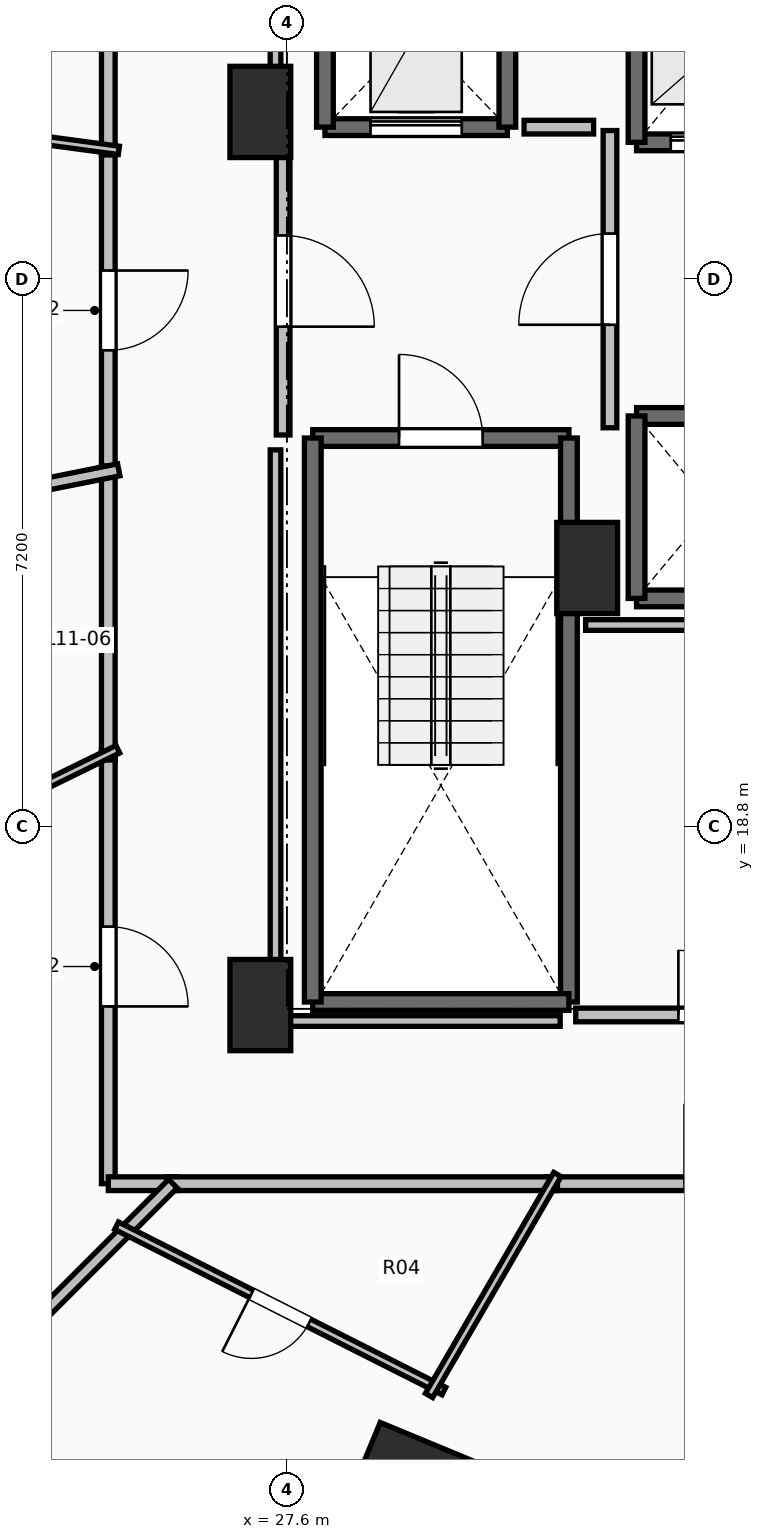
"""IFC4 building model, lengths in metres.
Left out: names, types, materials, properties, quantities, classifications, styles, units other than length and angle.
Written with IfcOpenShell. Run it as: python <this file> out.ifc"""

import sys

from ifc_helpers import new_model, si_unit, direction, frame, frame_2d, origin, origin_2d, place, context, subcontext, project, spatial, rectangle, extrude, element, fill, save


model = new_model("IFC4")
c1 = context("Model", 3, precision=1e-05, world=origin(), true_north=direction((0.0, 1.0)))
c2 = subcontext(c1, "Body", "Model", "MODEL_VIEW")
j1 = project(units=[si_unit("LENGTHUNIT", "METRE"), si_unit("PLANEANGLEUNIT", "RADIAN")], contexts=[c1])
p1 = place(None, origin())
s1 = spatial("IfcSite", under=j1, at=p1, CompositionType="ELEMENT")
p2 = place(p1, origin())
s2 = spatial("IfcBuilding", under=s1, at=p2, CompositionType="ELEMENT")
p3 = place(p2, frame((0.0, 0.0, 45.0)))
s3 = spatial("IfcBuildingStorey", under=s2, at=p3, CompositionType="ELEMENT", Elevation=45.0)
p4 = place(p3, frame((29.179, 10.109, 0.0), z_axis=(0.0, 0.0, 1.0), x_axis=(-0.382683432365, -0.923879532511, 0.0)))
e1 = element("IfcColumn", 1, at=p4, inside=s3, PredefinedType="COLUMN", context=c2, shape_type="SweptSolid", body=[
    extrude(rectangle(XDim=1.3, YDim=1.3, at=origin_2d()), origin(), (0.0, 0.0, 1.0), 3.5),
])
for number, where, z_axis, x_axis in (
    (2, (27.25, 16.45, 0.0), (0.0, 0.0, 1.0), (1.0, 0.0, 0.0)),
    (3, (27.25, 28.2, 0.0), (0.0, 0.0, 1.0), (1.0, 0.0, 0.0)),
    (4, (31.55, 22.2, 0.0), (0.0, 0.0, 1.0), (1.0, 0.0, 0.0)),
):
    element("IfcColumn", number, at=place(p3, frame(where, z_axis=z_axis, x_axis=x_axis)), inside=s3, PredefinedType="PILASTER", context=c2, shape_type="SweptSolid", body=[
        extrude(rectangle(XDim=0.8, YDim=1.2, at=origin_2d()), origin(), (0.0, 0.0, 1.0), 3.5),
    ])
p5 = place(p3, frame((27.94, 23.91, 0.0), z_axis=(0.0, 0.0, 1.0), x_axis=(1.0, 0.0, 0.0)))
e5 = element("IfcWall", 5, at=p5, inside=s3, PredefinedType="SOLIDWALL", context=c2, shape_type="SweptSolid", body=[
    extrude(rectangle(XDim=3.37, YDim=0.22, at=frame_2d((1.685, 0.0))), origin(), (0.0, 0.0, 1.0), 3.24),
])
p6 = place(p5, frame((1.135, 0.0, 0.0)))
e6 = element("IfcOpeningElement", 6, at=p6, cuts=e5, PredefinedType="OPENING", context=c2, shape_type="SweptSolid", body=[
    extrude(rectangle(XDim=1.1, YDim=2.15, at=frame_2d((0.55, 1.075))), frame((0.0, 0.125, 0.0), z_axis=(0.0, -1.0, 0.0), x_axis=(1.0, 0.0, 0.0)), (0.0, 0.0, 1.0), 0.25),
])
p7 = place(p3, frame((31.31, 23.91, 0.0), z_axis=(0.0, 0.0, 1.0), x_axis=(0.0, -1.0, 0.0)))
e7 = element("IfcWall", 7, at=p7, inside=s3, PredefinedType="SOLIDWALL", context=c2, shape_type="SweptSolid", body=[
    extrude(rectangle(XDim=7.42, YDim=0.22, at=frame_2d((3.71, 0.0))), origin(), (0.0, 0.0, 1.0), 3.24),
])
p8 = place(p3, frame((31.31, 16.49, 0.0), z_axis=(0.0, 0.0, 1.0), x_axis=(-1.0, 0.0, 0.0)))
e8 = element("IfcWall", 8, at=p8, inside=s3, PredefinedType="SOLIDWALL", context=c2, shape_type="SweptSolid", body=[
    extrude(rectangle(XDim=3.37, YDim=0.22, at=frame_2d((1.685, 0.0))), origin(), (0.0, 0.0, 1.0), 3.24),
])
p9 = place(p3, frame((27.94, 16.49, 0.0), z_axis=(0.0, 0.0, 1.0), x_axis=(0.0, 1.0, 0.0)))
e9 = element("IfcWall", 9, at=p9, inside=s3, PredefinedType="SOLIDWALL", context=c2, shape_type="SweptSolid", body=[
    extrude(rectangle(XDim=7.42, YDim=0.22, at=frame_2d((3.71, 0.0))), origin(), (0.0, 0.0, 1.0), 3.24),
])
p10 = place(p3, frame((32.2, 27.8, 0.0), z_axis=(0.0, 0.0, 1.0), x_axis=(1.0, 0.0, 0.0)))
e10 = element("IfcWall", 10, at=p10, inside=s3, PredefinedType="SOLIDWALL", context=c2, shape_type="SweptSolid", body=[
    extrude(rectangle(XDim=2.0, YDim=0.22, at=frame_2d((1.0, 0.0))), origin(), (0.0, 0.0, 1.0), 3.24),
])
p11 = place(p10, frame((0.45, 0.0, 0.0)))
e11 = element("IfcOpeningElement", 11, at=p11, cuts=e10, PredefinedType="OPENING", context=c2, shape_type="SweptSolid", body=[
    extrude(rectangle(XDim=1.1, YDim=2.2, at=frame_2d((0.55, 1.1))), frame((0.0, 0.125, 0.0), z_axis=(0.0, -1.0, 0.0), x_axis=(1.0, 0.0, 0.0)), (0.0, 0.0, 1.0), 0.25),
])
p12 = place(p3, frame((32.2, 30.2, 0.0), z_axis=(0.0, 0.0, 1.0), x_axis=(0.0, -1.0, 0.0)))
e12 = element("IfcWall", 12, at=p12, inside=s3, PredefinedType="SOLIDWALL", context=c2, shape_type="SweptSolid", body=[
    extrude(rectangle(XDim=2.4, YDim=0.22, at=frame_2d((1.2, 0.0))), origin(), (0.0, 0.0, 1.0), 3.24),
])
for number, where, z_axis, x_axis in (
    (13, (32.2, 21.8, 0.0), (0.0, 0.0, 1.0), (1.0, 0.0, 0.0)),
    (14, (34.2, 24.2, 0.0), (0.0, 0.0, 1.0), (-1.0, 0.0, 0.0)),
):
    element("IfcWall", number, at=place(p3, frame(where, z_axis=z_axis, x_axis=x_axis)), inside=s3, PredefinedType="SOLIDWALL", context=c2, shape_type="SweptSolid", body=[
        extrude(rectangle(XDim=2.0, YDim=0.22, at=frame_2d((1.0, 0.0))), origin(), (0.0, 0.0, 1.0), 3.24),
    ])
p13 = place(p3, frame((32.2, 24.2, 0.0), z_axis=(0.0, 0.0, 1.0), x_axis=(0.0, -1.0, 0.0)))
e15 = element("IfcWall", 15, at=p13, inside=s3, PredefinedType="SOLIDWALL", context=c2, shape_type="SweptSolid", body=[
    extrude(rectangle(XDim=2.4, YDim=0.22, at=frame_2d((1.2, 0.0))), origin(), (0.0, 0.0, 1.0), 3.24),
])
p14 = place(p3, frame((28.1, 28.0, 0.0), z_axis=(0.0, 0.0, 1.0), x_axis=(1.0, 0.0, 0.0)))
e16 = element("IfcWall", 16, at=p14, inside=s3, PredefinedType="SHEAR", context=c2, shape_type="SweptSolid", body=[
    extrude(rectangle(XDim=2.4, YDim=0.22, at=frame_2d((1.2, 0.0))), origin(), (0.0, 0.0, 1.0), 3.24),
])
p15 = place(p14, frame((0.6, 0.0, 0.0)))
e17 = element("IfcOpeningElement", 17, at=p15, cuts=e16, PredefinedType="OPENING", context=c2, shape_type="SweptSolid", body=[
    extrude(rectangle(XDim=1.2, YDim=2.2, at=frame_2d((0.6, 1.1))), frame((0.0, 0.125, 0.0), z_axis=(0.0, -1.0, 0.0), x_axis=(1.0, 0.0, 0.0)), (0.0, 0.0, 1.0), 0.25),
])
for number, where, z_axis, x_axis in (
    (18, (30.5, 28.0, 0.0), (0.0, 0.0, 1.0), (0.0, 1.0, 0.0)),
    (19, (28.1, 30.5, 0.0), (0.0, 0.0, 1.0), (0.0, -1.0, 0.0)),
):
    element("IfcWall", number, at=place(p3, frame(where, z_axis=z_axis, x_axis=x_axis)), inside=s3, PredefinedType="SHEAR", context=c2, shape_type="SweptSolid", body=[
        extrude(rectangle(XDim=2.5, YDim=0.22, at=frame_2d((1.25, 0.0))), origin(), (0.0, 0.0, 1.0), 3.24),
    ])
p16 = place(p3, frame((31.85, 24.045, 0.0), z_axis=(0.0, 0.0, 1.0), x_axis=(0.0, 1.0, 0.0)))
e20 = element("IfcWall", 20, at=p16, inside=s3, PredefinedType="PARTITIONING", context=c2, shape_type="SweptSolid", body=[
    extrude(rectangle(XDim=3.91, YDim=0.18, at=frame_2d((1.955, 0.0))), origin(), (0.0, 0.0, 1.0), 3.24),
])
p17 = place(p16, frame((1.355, 0.0, 0.0)))
e21 = element("IfcOpeningElement", 21, at=p17, cuts=e20, PredefinedType="OPENING", context=c2, shape_type="SweptSolid", body=[
    extrude(rectangle(XDim=1.2, YDim=2.15, at=frame_2d((0.6, 1.075))), frame((0.0, 0.105, 0.0), z_axis=(0.0, -1.0, 0.0), x_axis=(1.0, 0.0, 0.0)), (0.0, 0.0, 1.0), 0.21),
])
p18 = place(p3, frame((27.55, 28.0, 0.0), z_axis=(0.0, 0.0, 1.0), x_axis=(0.0, -1.0, 0.0)))
e22 = element("IfcWall", 22, at=p18, inside=s3, PredefinedType="PARTITIONING", context=c2, shape_type="SweptSolid", body=[
    extrude(rectangle(XDim=4.05, YDim=0.18, at=frame_2d((2.025, 0.0))), origin(), (0.0, 0.0, 1.0), 3.24),
])
p19 = place(p18, frame((1.425, 0.0, 0.0)))
e23 = element("IfcOpeningElement", 23, at=p19, cuts=e22, PredefinedType="OPENING", context=c2, shape_type="SweptSolid", body=[
    extrude(rectangle(XDim=1.2, YDim=2.15, at=frame_2d((0.6, 1.075))), frame((0.0, 0.105, 0.0), z_axis=(0.0, -1.0, 0.0), x_axis=(1.0, 0.0, 0.0)), (0.0, 0.0, 1.0), 0.21),
])
p20 = place(p3, frame((31.4, 16.32, 0.0), z_axis=(0.0, 0.0, 1.0), x_axis=(1.0, 0.0, 0.0)))
e24 = element("IfcWall", 24, at=p20, inside=s3, PredefinedType="PARTITIONING", context=c2, shape_type="SweptSolid", body=[
    extrude(rectangle(XDim=3.55, YDim=0.18, at=frame_2d((1.775, 0.0))), origin(), (0.0, 0.0, 1.0), 3.24),
])
p21 = place(p20, frame((1.35, 0.0, 0.0)))
e25 = element("IfcOpeningElement", 25, at=p21, cuts=e24, PredefinedType="OPENING", context=c2, shape_type="SweptSolid", body=[
    extrude(rectangle(XDim=0.85, YDim=2.1, at=frame_2d((0.425, 1.05))), frame((0.0, 0.105, 0.0), z_axis=(0.0, -1.0, 0.0), x_axis=(1.0, 0.0, 0.0)), (0.0, 0.0, 1.0), 0.21),
])
p22 = place(p3, frame((25.25, 27.774, 0.0), z_axis=(0.0, 0.0, 1.0), x_axis=(0.0, -1.0, 0.0)))
e26 = element("IfcWall", 26, at=p22, inside=s3, PredefinedType="PARTITIONING", context=c2, shape_type="SweptSolid", body=[
    extrude(rectangle(XDim=4.371, YDim=0.18, at=frame_2d((2.186, 0.0))), origin(), (0.0, 0.0, 1.0), 2.432),
])
p23 = place(p22, frame((1.66, 0.0, 0.0)))
e27 = element("IfcOpeningElement", 27, at=p23, cuts=e26, PredefinedType="OPENING", context=c2, shape_type="SweptSolid", body=[
    extrude(rectangle(XDim=1.05, YDim=2.2, at=frame_2d((0.525, 1.1))), frame((0.0, 0.105, 0.0), z_axis=(0.0, -1.0, 0.0), x_axis=(1.0, 0.0, 0.0)), (0.0, 0.0, 1.0), 0.21),
])
p24 = place(p3, frame((25.25, 31.361, 0.0), z_axis=(0.0, 0.0, 1.0), x_axis=(0.0, -1.0, 0.0)))
e28 = element("IfcWall", 28, at=p24, inside=s3, PredefinedType="PARTITIONING", context=c2, shape_type="SweptSolid", body=[
    extrude(rectangle(XDim=3.727, YDim=0.18, at=frame_2d((1.864, 0.0))), origin(), (0.0, 0.0, 1.0), 2.432),
])
p25 = place(p3, frame((25.25, 19.814, 0.0), z_axis=(0.0, 0.0, 1.0), x_axis=(0.0, -1.0, 0.0)))
e29 = element("IfcWall", 29, at=p25, inside=s3, PredefinedType="PARTITIONING", context=c2, shape_type="SweptSolid", body=[
    extrude(rectangle(XDim=5.714, YDim=0.18, at=frame_2d((2.857, 0.0))), origin(), (0.0, 0.0, 1.0), 2.432),
])
p26 = place(p25, frame((2.332, 0.0, 0.0)))
e30 = element("IfcOpeningElement", 30, at=p26, cuts=e29, PredefinedType="OPENING", context=c2, shape_type="SweptSolid", body=[
    extrude(rectangle(XDim=1.05, YDim=2.2, at=frame_2d((0.525, 1.1))), frame((0.0, 0.105, 0.0), z_axis=(0.0, -1.0, 0.0), x_axis=(1.0, 0.0, 0.0)), (0.0, 0.0, 1.0), 0.21),
])
p27 = place(p3, frame((25.25, 14.1, 0.0), z_axis=(0.0, 0.0, 1.0), x_axis=(1.0, 0.0, 0.0)))
e31 = element("IfcWall", 31, at=p27, inside=s3, PredefinedType="PARTITIONING", context=c2, shape_type="SweptSolid", body=[
    extrude(rectangle(XDim=0.91, YDim=0.18, at=frame_2d((0.455, 0.0))), origin(), (0.0, 0.0, 1.0), 2.886),
])
p28 = place(p3, frame((25.25, 23.543, 0.0), z_axis=(0.0, 0.0, 1.0), x_axis=(0.0, -1.0, 0.0)))
e32 = element("IfcWall", 32, at=p28, inside=s3, PredefinedType="PARTITIONING", context=c2, shape_type="SweptSolid", body=[
    extrude(rectangle(XDim=3.869, YDim=0.18, at=frame_2d((1.935, 0.0))), origin(), (0.0, 0.0, 1.0), 3.24),
])
p29 = place(p3, frame((31.019, 14.1, 0.0), z_axis=(0.0, 0.0, 1.0), x_axis=(1.0, 0.0, 0.0)))
e33 = element("IfcWall", 33, at=p29, inside=s3, PredefinedType="PARTITIONING", context=c2, shape_type="SweptSolid", body=[
    extrude(rectangle(XDim=4.674, YDim=0.18, at=frame_2d((2.337, 0.0))), origin(), (0.0, 0.0, 1.0), 3.24),
])
p30 = place(p29, frame((1.812, 0.0, 0.0)))
e34 = element("IfcOpeningElement", 34, at=p30, cuts=e33, PredefinedType="OPENING", context=c2, shape_type="SweptSolid", body=[
    extrude(rectangle(XDim=1.05, YDim=2.2, at=frame_2d((0.525, 1.1))), frame((0.0, 0.105, 0.0), z_axis=(0.0, -1.0, 0.0), x_axis=(1.0, 0.0, 0.0)), (0.0, 0.0, 1.0), 0.21),
])
p31 = place(p3, frame((26.02, 14.1, 0.0), z_axis=(0.0, 0.0, 1.0), x_axis=(1.0, 0.0, 0.0)))
e35 = element("IfcWall", 35, at=p31, inside=s3, PredefinedType="PARTITIONING", context=c2, shape_type="SweptSolid", body=[
    extrude(rectangle(XDim=5.139, YDim=0.18, at=frame_2d((2.569, 0.0))), origin(), (0.0, 0.0, 1.0), 2.432),
])
p32 = place(p3, frame((25.389, 27.694, 0.0), z_axis=(0.0, 0.0, 1.0), x_axis=(-0.991111683087, 0.133032445848, 0.0)))
e36 = element("IfcWall", 36, at=p32, inside=s3, PredefinedType="PARTITIONING", context=c2, shape_type="SweptSolid", body=[
    extrude(rectangle(XDim=5.504, YDim=0.11, at=frame_2d((2.752, 0.0))), origin(), (0.0, 0.0, 1.0), 2.432),
])
p33 = place(p32, frame((2.327, 0.0, 0.0)))
e37 = element("IfcOpeningElement", 37, at=p33, cuts=e36, PredefinedType="OPENING", context=c2, shape_type="SweptSolid", body=[
    extrude(rectangle(XDim=0.85, YDim=2.1, at=frame_2d((0.425, 1.05))), frame((0.0, 0.07, 0.0), z_axis=(0.0, -1.0, 0.0), x_axis=(1.0, 0.0, 0.0)), (0.0, 0.0, 1.0), 0.14),
])
p34 = place(p3, frame((20.285, 22.476, 0.0), z_axis=(0.0, 0.0, 1.0), x_axis=(0.980785905074, 0.195087181559, 0.0)))
e38 = element("IfcWall", 38, at=p34, inside=s3, PredefinedType="PARTITIONING", context=c2, shape_type="SweptSolid", body=[
    extrude(rectangle(XDim=5.202, YDim=0.16, at=frame_2d((2.601, 0.0))), origin(), (0.0, 0.0, 1.0), 2.886),
])
p35 = place(p3, frame((25.376, 19.816, 0.0), z_axis=(0.0, 0.0, 1.0), x_axis=(-0.89800930559, -0.439976461954, 0.0)))
e39 = element("IfcWall", 39, at=p35, inside=s3, PredefinedType="PARTITIONING", context=c2, shape_type="SweptSolid", body=[
    extrude(rectangle(XDim=3.096, YDim=0.11, at=frame_2d((1.548, 0.0))), origin(), (0.0, 0.0, 1.0), 3.24),
])
p36 = place(p3, frame((20.247, 8.247, 0.0), z_axis=(0.0, 0.0, 1.0), x_axis=(0.707106781187, 0.707106781187, 0.0)))
e40 = element("IfcWall", 40, at=p36, inside=s3, PredefinedType="PARTITIONING", context=c2, shape_type="SweptSolid", body=[
    extrude(rectangle(XDim=8.277, YDim=0.16, at=frame_2d((4.139, 0.0))), origin(), (0.0, 0.0, 1.0), 2.624),
])
p37 = place(p3, frame((29.665, 11.372, 0.0), z_axis=(0.0, 0.0, 1.0), x_axis=(-0.892577568201, 0.450893873039, 0.0)))
e41 = element("IfcWall", 41, at=p37, inside=s3, PredefinedType="PARTITIONING", context=c2, shape_type="SweptSolid", body=[
    extrude(rectangle(XDim=4.824, YDim=0.11, at=frame_2d((2.412, 0.0))), origin(), (0.0, 0.0, 1.0), 2.432),
])
p38 = place(p37, frame((1.987, 0.0, 0.0)))
e42 = element("IfcOpeningElement", 42, at=p38, cuts=e41, PredefinedType="OPENING", context=c2, shape_type="SweptSolid", body=[
    extrude(rectangle(XDim=0.85, YDim=2.1, at=frame_2d((0.425, 1.05))), frame((0.0, 0.07, 0.0), z_axis=(0.0, -1.0, 0.0), x_axis=(1.0, 0.0, 0.0)), (0.0, 0.0, 1.0), 0.14),
])
p39 = place(p3, frame((31.158, 14.221, 0.0), z_axis=(0.0, 0.0, 1.0), x_axis=(-0.50222661214, -0.864736046466, 0.0)))
e43 = element("IfcWall", 43, at=p39, inside=s3, PredefinedType="PARTITIONING", context=c2, shape_type="SweptSolid", body=[
    extrude(rectangle(XDim=3.362, YDim=0.11, at=frame_2d((1.681, 0.0))), origin(), (0.0, 0.0, 1.0), 2.886),
])
p40 = place(p3, frame((31.635, 28.0, 0.0), z_axis=(0.0, 0.0, 1.0), x_axis=(-1.0, 0.0, 0.0)))
e44 = element("IfcWall", 44, at=p40, inside=s3, PredefinedType="PARTITIONING", context=c2, shape_type="SweptSolid", body=[
    extrude(rectangle(XDim=0.915, YDim=0.18, at=frame_2d((0.458, 0.0))), origin(), (0.0, 0.0, 1.0), 3.24),
])
p41 = place(p3, frame((34.73, 21.45, 0.0), z_axis=(0.0, 0.0, 1.0), x_axis=(-1.0, 0.0, 0.0)))
e45 = element("IfcWall", 45, at=p41, inside=s3, PredefinedType="PARTITIONING", context=c2, shape_type="SweptSolid", body=[
    extrude(rectangle(XDim=3.2, YDim=0.14, at=frame_2d((1.6, 0.0))), origin(), (0.0, 0.0, 1.0), 3.24),
])
p42 = place(p3, frame((31.195, 16.24, 0.0), z_axis=(0.0, 0.0, 1.0), x_axis=(-1.0, 0.0, 0.0)))
e46 = element("IfcWall", 46, at=p42, inside=s3, PredefinedType="PARTITIONING", context=c2, shape_type="SweptSolid", body=[
    extrude(rectangle(XDim=3.745, YDim=0.14, at=frame_2d((1.873, 0.0))), origin(), (0.0, 0.0, 1.0), 2.432),
])
p43 = place(p3, frame((27.45, 16.24, 0.0), z_axis=(0.0, 0.0, 1.0), x_axis=(0.0, 1.0, 0.0)))
e47 = element("IfcWall", 47, at=p43, inside=s3, PredefinedType="PARTITIONING", context=c2, shape_type="SweptSolid", body=[
    extrude(rectangle(XDim=7.514, YDim=0.14, at=frame_2d((3.757, 0.0))), origin(), (0.0, 0.0, 1.0), 2.432),
])
p44 = place(p3, frame((27.45, 28.196, 0.0), z_axis=(0.0, 0.0, 1.0), x_axis=(0.0, 1.0, 0.0)))
e48 = element("IfcWall", 48, at=p44, inside=s3, PredefinedType="PARTITIONING", context=c2, shape_type="SweptSolid", body=[
    extrude(rectangle(XDim=5.254, YDim=0.14, at=frame_2d((2.627, 0.0))), origin(), (0.0, 0.0, 1.0), 2.432),
])
p45 = place(p6, origin())
e49 = element("IfcDoor", 49, at=p45, inside=s3, OperationType="SINGLE_SWING_LEFT", PredefinedType="DOOR", context=c2, shape_type="SweptSolid", body=[
    extrude(rectangle(XDim=1.1, YDim=2.15, at=frame_2d((0.55, 1.075))), frame((0.0, 0.025, 0.0), z_axis=(0.0, -1.0, 0.0), x_axis=(1.0, 0.0, 0.0)), (0.0, 0.0, 1.0), 0.05),
])
fill(e6, e49)
p46 = place(p11, origin())
e50 = element("IfcDoor", 50, at=p46, inside=s3, OperationType="SLIDING_TO_LEFT", PredefinedType="DOOR", context=c2, shape_type="SweptSolid", body=[
    extrude(rectangle(XDim=1.1, YDim=2.2, at=frame_2d((0.55, 1.1))), frame((0.0, 0.025, 0.0), z_axis=(0.0, -1.0, 0.0), x_axis=(1.0, 0.0, 0.0)), (0.0, 0.0, 1.0), 0.05),
])
fill(e11, e50)
p47 = place(p15, origin())
e51 = element("IfcDoor", 51, at=p47, inside=s3, OperationType="SLIDING_TO_LEFT", PredefinedType="DOOR", context=c2, shape_type="SweptSolid", body=[
    extrude(rectangle(XDim=1.2, YDim=2.2, at=frame_2d((0.6, 1.1))), frame((0.0, 0.025, 0.0), z_axis=(0.0, -1.0, 0.0), x_axis=(1.0, 0.0, 0.0)), (0.0, 0.0, 1.0), 0.05),
])
fill(e17, e51)
p48 = place(p17, origin())
e52 = element("IfcDoor", 52, at=p48, inside=s3, OperationType="SINGLE_SWING_LEFT", PredefinedType="DOOR", context=c2, shape_type="SweptSolid", body=[
    extrude(rectangle(XDim=1.2, YDim=2.15, at=frame_2d((0.6, 1.075))), frame((0.0, 0.025, 0.0), z_axis=(0.0, -1.0, 0.0), x_axis=(1.0, 0.0, 0.0)), (0.0, 0.0, 1.0), 0.05),
])
fill(e21, e52)
p49 = place(p19, origin())
e53 = element("IfcDoor", 53, at=p49, inside=s3, OperationType="SINGLE_SWING_RIGHT", PredefinedType="DOOR", context=c2, shape_type="SweptSolid", body=[
    extrude(rectangle(XDim=1.2, YDim=2.15, at=frame_2d((0.6, 1.075))), frame((0.0, 0.025, 0.0), z_axis=(0.0, -1.0, 0.0), x_axis=(1.0, 0.0, 0.0)), (0.0, 0.0, 1.0), 0.05),
])
fill(e23, e53)
p50 = place(p21, origin())
e54 = element("IfcDoor", 54, at=p50, inside=s3, OperationType="SINGLE_SWING_LEFT", PredefinedType="DOOR", context=c2, shape_type="SweptSolid", body=[
    extrude(rectangle(XDim=0.85, YDim=2.1, at=frame_2d((0.425, 1.05))), frame((0.0, 0.025, 0.0), z_axis=(0.0, -1.0, 0.0), x_axis=(1.0, 0.0, 0.0)), (0.0, 0.0, 1.0), 0.05),
])
fill(e25, e54)
p51 = place(p23, origin())
e55 = element("IfcDoor", 55, at=p51, inside=s3, OperationType="SINGLE_SWING_LEFT", PredefinedType="DOOR", context=c2, shape_type="SweptSolid", body=[
    extrude(rectangle(XDim=1.05, YDim=2.2, at=frame_2d((0.525, 1.1))), frame((0.0, 0.025, 0.0), z_axis=(0.0, -1.0, 0.0), x_axis=(1.0, 0.0, 0.0)), (0.0, 0.0, 1.0), 0.05),
])
fill(e27, e55)
p52 = place(p26, origin())
e56 = element("IfcDoor", 56, at=p52, inside=s3, OperationType="SINGLE_SWING_RIGHT", PredefinedType="DOOR", context=c2, shape_type="SweptSolid", body=[
    extrude(rectangle(XDim=1.05, YDim=2.2, at=frame_2d((0.525, 1.1))), frame((0.0, 0.025, 0.0), z_axis=(0.0, -1.0, 0.0), x_axis=(1.0, 0.0, 0.0)), (0.0, 0.0, 1.0), 0.05),
])
fill(e30, e56)
p53 = place(p38, origin())
e57 = element("IfcDoor", 57, at=p53, inside=s3, OperationType="SINGLE_SWING_RIGHT", PredefinedType="DOOR", context=c2, shape_type="SweptSolid", body=[
    extrude(rectangle(XDim=0.85, YDim=2.1, at=frame_2d((0.425, 1.05))), frame((0.0, 0.025, 0.0), z_axis=(0.0, -1.0, 0.0), x_axis=(1.0, 0.0, 0.0)), (0.0, 0.0, 1.0), 0.05),
])
fill(e42, e57)
save(model, sys.argv[1])
